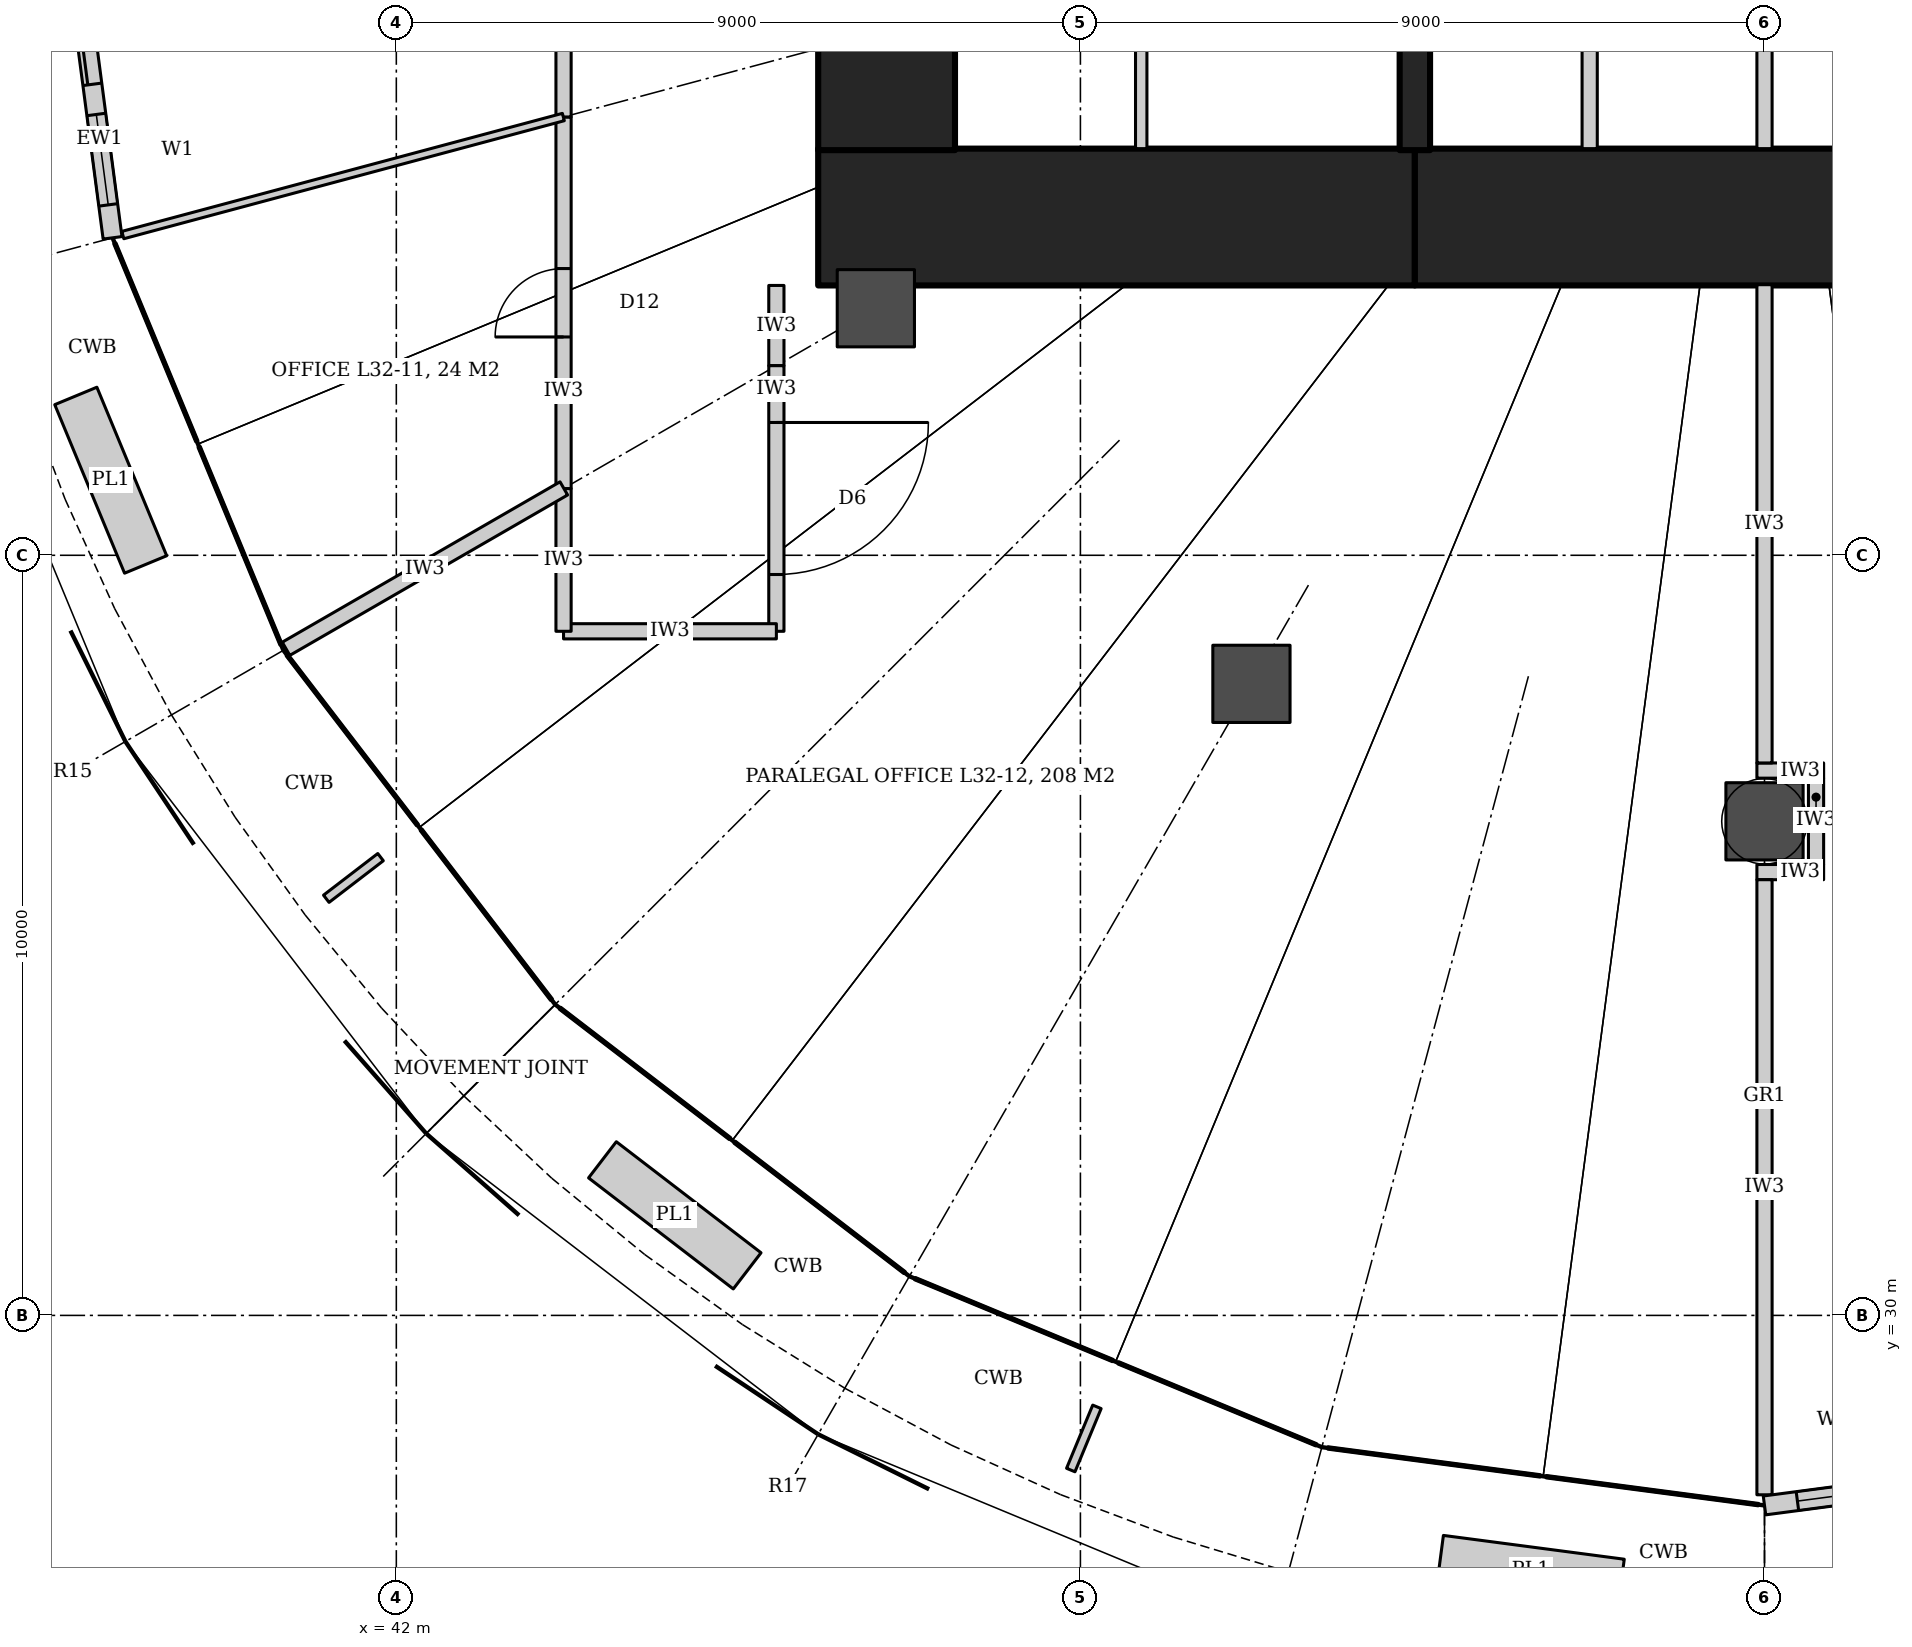
"""IFC4 building model, lengths in metres.
Left out: names, types, materials, properties, quantities, classifications, styles, units other than length and angle.
Written with IfcOpenShell. Run it as: python <this file> out.ifc"""

import sys

from ifc_helpers import new_model, si_unit, direction, frame, frame_2d, origin, origin_2d, place, context, subcontext, project, spatial, rectangle, hollow_circle, extrude, element, fill, save


model = new_model("IFC4")
c1 = context("Model", 3, precision=1e-05, world=origin(), true_north=direction((0.0, 1.0)))
c2 = subcontext(c1, "Body", "Model", "MODEL_VIEW")
j1 = project(units=[si_unit("LENGTHUNIT", "METRE"), si_unit("PLANEANGLEUNIT", "RADIAN")], contexts=[c1])
p1 = place(None, origin())
s1 = spatial("IfcSite", under=j1, at=p1, CompositionType="ELEMENT")
p2 = place(p1, origin())
s2 = spatial("IfcBuilding", under=s1, at=p2, CompositionType="ELEMENT")
p3 = place(p2, frame((0.0, 0.0, 135.2)))
s3 = spatial("IfcBuildingStorey", under=s2, at=p3, CompositionType="ELEMENT", Elevation=135.2)
p4 = place(p3, frame((47.55, 44.45, 0.0), z_axis=(0.0, 0.0, 1.0), x_axis=(1.0, 0.0, 0.0)))
e1 = element("IfcWall", 1, at=p4, inside=s3, PredefinedType="SHEAR", context=c2, shape_type="SweptSolid", body=[
    extrude(rectangle(XDim=7.85, YDim=1.8, at=frame_2d((3.925, 0.0))), origin(), (0.0, 0.0, 1.0), 4.2),
])
p5 = place(p3, frame((55.4, 44.45, 0.0), z_axis=(0.0, 0.0, 1.0), x_axis=(1.0, 0.0, 0.0)))
e2 = element("IfcWall", 2, at=p5, inside=s3, PredefinedType="SHEAR", context=c2, shape_type="SweptSolid", body=[
    extrude(rectangle(XDim=9.2, YDim=1.8, at=frame_2d((4.6, 0.0))), origin(), (0.0, 0.0, 1.0), 4.2),
])
p6 = place(p3, frame((48.45, 45.33, 0.0), z_axis=(0.0, 0.0, 1.0), x_axis=(0.0, 1.0, 0.0)))
e3 = element("IfcWall", 3, at=p6, inside=s3, PredefinedType="SHEAR", context=c2, shape_type="SweptSolid", body=[
    extrude(rectangle(XDim=3.17, YDim=1.8, at=frame_2d((1.585, 0.0))), origin(), (0.0, 0.0, 1.0), 4.2),
])
p7 = place(p3, frame((55.4, 48.32, 0.0), z_axis=(0.0, 0.0, 1.0), x_axis=(0.0, -1.0, 0.0)))
e4 = element("IfcWall", 4, at=p7, inside=s3, PredefinedType="SHEAR", context=c2, shape_type="SweptSolid", body=[
    extrude(rectangle(XDim=2.99, YDim=0.4, at=frame_2d((1.495, 0.0))), origin(), (0.0, 0.0, 1.0), 4.2),
])
for number, where, z_axis, x_axis in (
    (5, (48.309, 43.25, 0.0), (0.0, 0.0, 1.0), (1.0, 0.0, 0.0)),
    (6, (53.25, 38.309, 0.0), (0.0, 0.0, 1.0), (1.0, 0.0, 0.0)),
    (7, (60.0, 36.5, 0.0), (0.0, 0.0, 1.0), (1.0, 0.0, 0.0)),
):
    element("IfcColumn", number, at=place(p3, frame(where, z_axis=z_axis, x_axis=x_axis)), inside=s3, PredefinedType="COLUMN", context=c2, shape_type="SweptSolid", body=[
        extrude(hollow_circle(Radius=0.508, WallThickness=0.05, at=origin_2d()), origin(), (0.0, 0.0, 1.0), 4.2),
    ])
p8 = place(p3, frame((47.0, 43.55, 0.0), z_axis=(0.0, 0.0, 1.0), x_axis=(0.0, -1.0, 0.0)))
e8 = element("IfcWall", 8, at=p8, inside=s3, PredefinedType="PARTITIONING", context=c2, shape_type="SweptSolid", body=[
    extrude(rectangle(XDim=1.056, YDim=0.2, at=frame_2d((0.528, 0.0))), origin(), (0.0, 0.0, 1.0), 3.04),
])
p9 = place(p3, frame((47.0, 42.494, 0.0), z_axis=(0.0, 0.0, 1.0), x_axis=(0.0, -1.0, 0.0)))
e9 = element("IfcWall", 9, at=p9, inside=s3, PredefinedType="PARTITIONING", context=c2, shape_type="SweptSolid", body=[
    extrude(rectangle(XDim=3.494, YDim=0.2, at=frame_2d((1.747, 0.0))), origin(), (0.0, 0.0, 1.0), 3.04),
])
p10 = place(p9, frame((0.747, 0.0, 0.0)))
e10 = element("IfcOpeningElement", 10, at=p10, cuts=e9, PredefinedType="OPENING", context=c2, shape_type="SweptSolid", body=[
    extrude(rectangle(XDim=2.0, YDim=2.1, at=frame_2d((1.0, 1.05))), frame((0.0, 0.11, 0.0), z_axis=(0.0, -1.0, 0.0), x_axis=(1.0, 0.0, 0.0)), (0.0, 0.0, 1.0), 0.22),
])
p11 = place(p3, frame((47.0, 39.0, 0.0), z_axis=(0.0, 0.0, 1.0), x_axis=(-1.0, 0.0, 0.0)))
e11 = element("IfcWall", 11, at=p11, inside=s3, PredefinedType="PARTITIONING", context=c2, shape_type="SweptSolid", body=[
    extrude(rectangle(XDim=2.8, YDim=0.2, at=frame_2d((1.4, 0.0))), origin(), (0.0, 0.0, 1.0), 3.04),
])
p12 = place(p3, frame((44.2, 39.0, 0.0), z_axis=(0.0, 0.0, 1.0), x_axis=(0.0, 1.0, 0.0)))
e12 = element("IfcWall", 12, at=p12, inside=s3, PredefinedType="PARTITIONING", context=c2, shape_type="SweptSolid", body=[
    extrude(rectangle(XDim=1.878, YDim=0.2, at=frame_2d((0.939, 0.0))), origin(), (0.0, 0.0, 1.0), 3.04),
])
p13 = place(p3, frame((44.2, 40.878, 0.0), z_axis=(0.0, 0.0, 1.0), x_axis=(0.0, 1.0, 0.0)))
e13 = element("IfcWall", 13, at=p13, inside=s3, PredefinedType="PARTITIONING", context=c2, shape_type="SweptSolid", body=[
    extrude(rectangle(XDim=4.888, YDim=0.2, at=frame_2d((2.444, 0.0))), origin(), (0.0, 0.0, 1.0), 3.04),
])
p14 = place(p13, frame((1.994, 0.0, 0.0)))
e14 = element("IfcOpeningElement", 14, at=p14, cuts=e13, PredefinedType="OPENING", context=c2, shape_type="SweptSolid", body=[
    extrude(rectangle(XDim=0.9, YDim=2.4, at=frame_2d((0.45, 1.2))), frame((0.0, 0.11, 0.0), z_axis=(0.0, -1.0, 0.0), x_axis=(1.0, 0.0, 0.0)), (0.0, 0.0, 1.0), 0.22),
])
p15 = place(p3, frame((44.2, 45.766, 0.0), z_axis=(0.0, 0.0, 1.0), x_axis=(0.0, 1.0, 0.0)))
e15 = element("IfcWall", 15, at=p15, inside=s3, PredefinedType="PARTITIONING", context=c2, shape_type="SweptSolid", body=[
    extrude(rectangle(XDim=4.234, YDim=0.2, at=frame_2d((2.117, 0.0))), origin(), (0.0, 0.0, 1.0), 3.04),
])
p16 = place(p15, frame((1.667, 0.0, 0.0)))
e16 = element("IfcOpeningElement", 16, at=p16, cuts=e15, PredefinedType="OPENING", context=c2, shape_type="SweptSolid", body=[
    extrude(rectangle(XDim=0.9, YDim=2.4, at=frame_2d((0.45, 1.2))), frame((0.0, 0.11, 0.0), z_axis=(0.0, -1.0, 0.0), x_axis=(1.0, 0.0, 0.0)), (0.0, 0.0, 1.0), 0.22),
])
p17 = place(p3, frame((44.198, 45.766, 0.0), z_axis=(0.0, 0.0, 1.0), x_axis=(-0.965932688119, -0.258793435045, 0.0)))
e17 = element("IfcWall", 17, at=p17, inside=s3, PredefinedType="PARTITIONING", context=c2, shape_type="SweptSolid", body=[
    extrude(rectangle(XDim=6.1, YDim=0.1, at=frame_2d((3.05, 0.0))), origin(), (0.0, 0.0, 1.0), 3.04),
])
p18 = place(p3, frame((44.204, 40.88, 0.0), z_axis=(0.0, 0.0, 1.0), x_axis=(-0.866033125095, -0.499986626058, 0.0)))
e18 = element("IfcWall", 18, at=p18, inside=s3, PredefinedType="PARTITIONING", context=c2, shape_type="SweptSolid", body=[
    extrude(rectangle(XDim=4.32, YDim=0.2, at=frame_2d((2.16, 0.0))), origin(), (0.0, 0.0, 1.0), 3.04),
])
for number, where, z_axis, x_axis in (
    (19, (59.9, 37.168, 0.0), (0.0, 0.0, 1.0), (1.0, 0.0, 0.0)),
    (20, (59.9, 35.832, 0.0), (0.0, 0.0, 1.0), (1.0, 0.0, 0.0)),
):
    element("IfcWall", number, at=place(p3, frame(where, z_axis=z_axis, x_axis=x_axis)), inside=s3, PredefinedType="PARTITIONING", context=c2, shape_type="SweptSolid", body=[
        extrude(rectangle(XDim=0.878, YDim=0.2, at=frame_2d((0.439, 0.0))), origin(), (0.0, 0.0, 1.0), 3.02),
    ])
p19 = place(p3, frame((60.678, 37.068, 0.0), z_axis=(0.0, 0.0, 1.0), x_axis=(0.0, -1.0, 0.0)))
e21 = element("IfcWall", 21, at=p19, inside=s3, PredefinedType="PARTITIONING", context=c2, shape_type="SweptSolid", body=[
    extrude(rectangle(XDim=1.136, YDim=0.2, at=frame_2d((0.568, 0.0))), origin(), (0.0, 0.0, 1.0), 3.02),
])
p20 = place(p3, frame((60.0, 43.56, 0.0), z_axis=(0.0, 0.0, 1.0), x_axis=(0.0, -1.0, 0.0)))
e22 = element("IfcWall", 22, at=p20, inside=s3, PredefinedType="PARTITIONING", context=c2, shape_type="SweptSolid", body=[
    extrude(rectangle(XDim=6.292, YDim=0.2, at=frame_2d((3.146, 0.0))), origin(), (0.0, 0.0, 1.0), 3.04),
])
p21 = place(p3, frame((60.0, 35.732, 0.0), z_axis=(0.0, 0.0, 1.0), x_axis=(0.0, -1.0, 0.0)))
e23 = element("IfcWall", 23, at=p21, inside=s3, PredefinedType="PARTITIONING", context=c2, shape_type="SweptSolid", body=[
    extrude(rectangle(XDim=8.192, YDim=0.2, at=frame_2d((4.096, 0.0))), origin(), (0.0, 0.0, 1.0), 3.04),
])
p22 = place(p3, frame((37.4, 50.0, 0.0), z_axis=(0.0, 0.0, 1.0), x_axis=(0.130556203128, -0.991440909901, 0.0)))
e24 = element("IfcWall", 24, at=p22, inside=s3, PredefinedType="SOLIDWALL", context=c2, shape_type="SweptSolid", body=[
    extrude(rectangle(XDim=5.9, YDim=0.25, at=frame_2d((2.95, 0.0))), origin(), (0.0, 0.0, 1.0), 4.04),
])
p23 = place(p22, frame((2.05, 0.0, 0.0)))
e25 = element("IfcOpeningElement", 25, at=p23, cuts=e24, PredefinedType="OPENING", context=c2, shape_type="SweptSolid", body=[
    extrude(rectangle(XDim=1.8, YDim=2.4, at=frame_2d((0.9, 1.2))), frame((0.0, 0.135, 0.0), z_axis=(0.0, -1.0, 0.0), x_axis=(1.0, 0.0, 0.0)), (0.0, 0.0, 1.0), 0.27),
])
p24 = place(p22, frame((0.45, 0.0, 0.0)))
e26 = element("IfcOpeningElement", 26, at=p24, cuts=e24, PredefinedType="OPENING", context=c2, shape_type="SweptSolid", body=[
    extrude(rectangle(XDim=1.2, YDim=2.4, at=frame_2d((0.6, 1.2))), frame((0.0, 0.135, 0.0), z_axis=(0.0, -1.0, 0.0), x_axis=(1.0, 0.0, 0.0)), (0.0, 0.0, 1.0), 0.27),
])
p25 = place(p22, frame((4.25, 0.0, 0.0)))
e27 = element("IfcOpeningElement", 27, at=p25, cuts=e24, PredefinedType="OPENING", context=c2, shape_type="SweptSolid", body=[
    extrude(rectangle(XDim=1.2, YDim=2.4, at=frame_2d((0.6, 1.2))), frame((0.0, 0.135, 0.0), z_axis=(0.0, -1.0, 0.0), x_axis=(1.0, 0.0, 0.0)), (0.0, 0.0, 1.0), 0.27),
])
p26 = place(p3, frame((60.0, 27.4, 0.0), z_axis=(0.0, 0.0, 1.0), x_axis=(0.991440909901, 0.130556203128, 0.0)))
e28 = element("IfcWall", 28, at=p26, inside=s3, PredefinedType="SOLIDWALL", context=c2, shape_type="SweptSolid", body=[
    extrude(rectangle(XDim=5.9, YDim=0.25, at=frame_2d((2.95, 0.0))), origin(), (0.0, 0.0, 1.0), 4.04),
])
p27 = place(p26, frame((2.05, 0.0, 0.0)))
e29 = element("IfcOpeningElement", 29, at=p27, cuts=e28, PredefinedType="OPENING", context=c2, shape_type="SweptSolid", body=[
    extrude(rectangle(XDim=1.8, YDim=2.4, at=frame_2d((0.9, 1.2))), frame((0.0, 0.135, 0.0), z_axis=(0.0, -1.0, 0.0), x_axis=(1.0, 0.0, 0.0)), (0.0, 0.0, 1.0), 0.27),
])
p28 = place(p26, frame((0.45, 0.0, 0.0)))
e30 = element("IfcOpeningElement", 30, at=p28, cuts=e28, PredefinedType="OPENING", context=c2, shape_type="SweptSolid", body=[
    extrude(rectangle(XDim=1.2, YDim=2.4, at=frame_2d((0.6, 1.2))), frame((0.0, 0.135, 0.0), z_axis=(0.0, -1.0, 0.0), x_axis=(1.0, 0.0, 0.0)), (0.0, 0.0, 1.0), 0.27),
])
p29 = place(p26, frame((4.25, 0.0, 0.0)))
e31 = element("IfcOpeningElement", 31, at=p29, cuts=e28, PredefinedType="OPENING", context=c2, shape_type="SweptSolid", body=[
    extrude(rectangle(XDim=1.2, YDim=2.4, at=frame_2d((0.6, 1.2))), frame((0.0, 0.135, 0.0), z_axis=(0.0, -1.0, 0.0), x_axis=(1.0, 0.0, 0.0)), (0.0, 0.0, 1.0), 0.27),
])
for number, where, z_axis, x_axis in (
    (32, (57.7, 45.35, 0.0), (0.0, 0.0, 1.0), (0.0, 1.0, 0.0)),
    (33, (60.0, 45.35, 0.0), (0.0, 0.0, 1.0), (0.0, 1.0, 0.0)),
):
    element("IfcWall", number, at=place(p3, frame(where, z_axis=z_axis, x_axis=x_axis)), inside=s3, PredefinedType="PARTITIONING", context=c2, shape_type="SweptSolid", body=[
        extrude(rectangle(XDim=2.95, YDim=0.2, at=frame_2d((1.475, 0.0))), origin(), (0.0, 0.0, 1.0), 4.2),
    ])
p30 = place(p3, frame((51.8, 45.35, 0.0), z_axis=(0.0, 0.0, 1.0), x_axis=(0.0, 1.0, 0.0)))
e34 = element("IfcWall", 34, at=p30, inside=s3, PredefinedType="PARTITIONING", context=c2, shape_type="SweptSolid", body=[
    extrude(rectangle(XDim=2.95, YDim=0.15, at=frame_2d((1.475, 0.0))), origin(), (0.0, 0.0, 1.0), 4.04),
])
p31 = place(p14, origin())
e35 = element("IfcDoor", 35, at=p31, inside=s3, OperationType="SINGLE_SWING_LEFT", PredefinedType="DOOR", context=c2, shape_type="SweptSolid", body=[
    extrude(rectangle(XDim=0.9, YDim=2.4, at=frame_2d((0.45, 1.2))), frame((0.0, 0.025, 0.0), z_axis=(0.0, -1.0, 0.0), x_axis=(1.0, 0.0, 0.0)), (0.0, 0.0, 1.0), 0.05),
])
fill(e14, e35)
p32 = place(p10, origin())
e36 = element("IfcDoor", 36, at=p32, inside=s3, OperationType="DOUBLE_DOOR_DOUBLE_SWING", PredefinedType="DOOR", context=c2, shape_type="SweptSolid", body=[
    extrude(rectangle(XDim=2.0, YDim=2.1, at=frame_2d((1.0, 1.05))), frame((0.0, 0.025, 0.0), z_axis=(0.0, -1.0, 0.0), x_axis=(1.0, 0.0, 0.0)), (0.0, 0.0, 1.0), 0.05),
])
fill(e10, e36)
p33 = place(p23, origin())
e37 = element("IfcDoor", 37, at=p33, inside=s3, OperationType="DOUBLE_DOOR_SLIDING", PredefinedType="DOOR", context=c2, shape_type="SweptSolid", body=[
    extrude(rectangle(XDim=1.8, YDim=2.4, at=frame_2d((0.9, 1.2))), frame((0.0, 0.025, 0.0), z_axis=(0.0, -1.0, 0.0), x_axis=(1.0, 0.0, 0.0)), (0.0, 0.0, 1.0), 0.05),
])
fill(e25, e37)
p34 = place(p25, origin())
e38 = element("IfcWindow", 38, at=p34, inside=s3, PartitioningType="SINGLE_PANEL", PredefinedType="WINDOW", context=c2, shape_type="SweptSolid", body=[
    extrude(rectangle(XDim=1.2, YDim=2.4, at=frame_2d((0.6, 1.2))), frame((0.0, 0.03, 0.0), z_axis=(0.0, -1.0, 0.0), x_axis=(1.0, 0.0, 0.0)), (0.0, 0.0, 1.0), 0.06),
])
fill(e27, e38)
p35 = place(p28, origin())
e39 = element("IfcWindow", 39, at=p35, inside=s3, PartitioningType="SINGLE_PANEL", PredefinedType="WINDOW", context=c2, shape_type="SweptSolid", body=[
    extrude(rectangle(XDim=1.2, YDim=2.4, at=frame_2d((0.6, 1.2))), frame((0.0, 0.03, 0.0), z_axis=(0.0, -1.0, 0.0), x_axis=(1.0, 0.0, 0.0)), (0.0, 0.0, 1.0), 0.06),
])
fill(e30, e39)
save(model, sys.argv[1])
